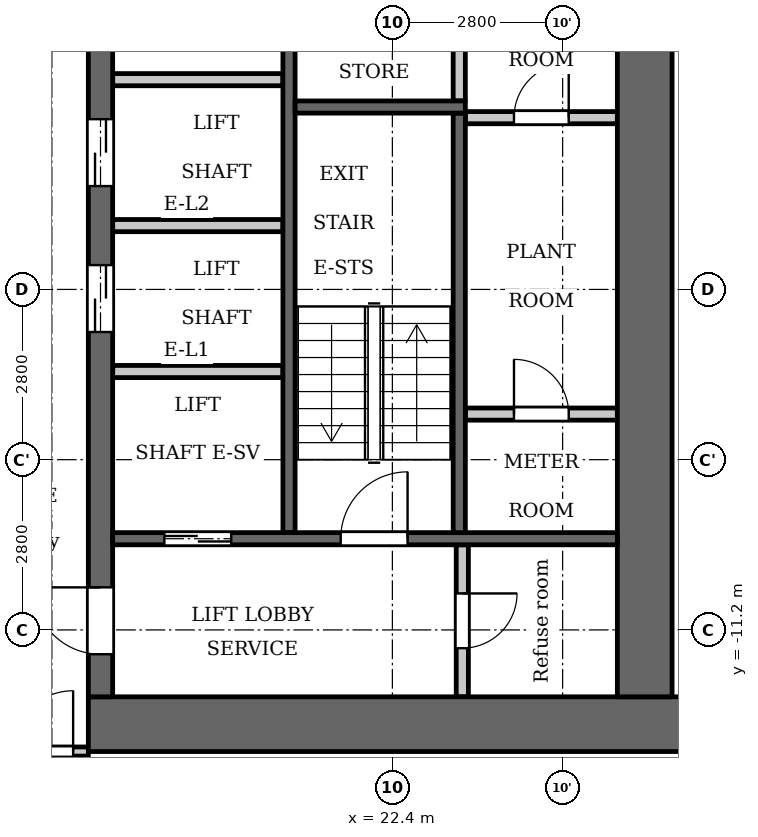
"""IFC4 building model, lengths in metres.
Left out: names, types, materials, properties, quantities, classifications, styles, units other than length and angle.
Written with IfcOpenShell. Run it as: python <this file> out.ifc"""

import sys

from ifc_helpers import new_model, si_unit, direction, frame, frame_2d, origin, place, context, subcontext, project, spatial, rectangle, extrude, element, fill, save


model = new_model("IFC4")
c1 = context("Model", 3, precision=1e-05, world=origin(), true_north=direction((0.0, 1.0)))
c2 = subcontext(c1, "Body", "Model", "MODEL_VIEW")
j1 = project(units=[si_unit("LENGTHUNIT", "METRE"), si_unit("PLANEANGLEUNIT", "RADIAN")], contexts=[c1])
p1 = place(None, origin())
s1 = spatial("IfcSite", under=j1, at=p1, CompositionType="ELEMENT")
p2 = place(p1, origin())
s2 = spatial("IfcBuilding", under=s1, at=p2, CompositionType="ELEMENT")
p3 = place(p2, frame((0.0, 0.0, 90.3)))
s3 = spatial("IfcBuildingStorey", under=s2, at=p3, CompositionType="ELEMENT", Elevation=90.3)
p4 = place(p3, frame((23.5, -2.5, 0.0), z_axis=(0.0, 0.0, 1.0), x_axis=(0.0, 1.0, 0.0)))
e1 = element("IfcWall", 1, at=p4, inside=s3, PredefinedType="PARTITIONING", context=c2, shape_type="SweptSolid", body=[
    extrude(rectangle(XDim=2.65, YDim=0.2, at=frame_2d((1.325, 0.0))), origin(), (0.0, 0.0, 1.0), 3.2),
])
p5 = place(p3, frame((20.7, -9.6, 0.0), z_axis=(0.0, 0.0, 1.0), x_axis=(0.0, 1.0, 0.0)))
e2 = element("IfcWall", 2, at=p5, inside=s3, PredefinedType="SHEAR", context=c2, shape_type="SweptSolid", body=[
    extrude(rectangle(XDim=9.75, YDim=0.2, at=frame_2d((4.875, 0.0))), origin(), (0.0, 0.0, 1.0), 3.2),
])
p6 = place(p3, frame((17.4, -12.75, 0.0), z_axis=(0.0, 0.0, 1.0), x_axis=(1.0, 0.0, 0.0)))
e3 = element("IfcWall", 3, at=p6, inside=s3, PredefinedType="SHEAR", context=c2, shape_type="SweptSolid", body=[
    extrude(rectangle(XDim=10.4, YDim=0.9, at=frame_2d((5.2, 0.0))), origin(), (0.0, 0.0, 1.0), 3.2),
])
p7 = place(p3, frame((17.6, -12.3, 0.0), z_axis=(0.0, 0.0, 1.0), x_axis=(0.0, 1.0, 0.0)))
e4 = element("IfcWall", 4, at=p7, inside=s3, PredefinedType="SHEAR", context=c2, shape_type="SweptSolid", body=[
    extrude(rectangle(XDim=24.6, YDim=0.4, at=frame_2d((12.3, 0.0))), origin(), (0.0, 0.0, 1.0), 3.2),
])
p8 = place(p7, frame((6.0, 0.0, 0.0)))
e5 = element("IfcOpeningElement", 5, at=p8, cuts=e4, PredefinedType="OPENING", context=c2, shape_type="SweptSolid", body=[
    extrude(rectangle(XDim=1.1, YDim=2.1, at=frame_2d((0.55, 1.05))), frame((0.0, 0.21, 0.0), z_axis=(0.0, -1.0, 0.0), x_axis=(1.0, 0.0, 0.0)), (0.0, 0.0, 1.0), 0.42),
])
p9 = place(p7, frame((8.4, 0.0, 0.0)))
e6 = element("IfcOpeningElement", 6, at=p9, cuts=e4, PredefinedType="OPENING", context=c2, shape_type="SweptSolid", body=[
    extrude(rectangle(XDim=1.1, YDim=2.1, at=frame_2d((0.55, 1.05))), frame((0.0, 0.21, 0.0), z_axis=(0.0, -1.0, 0.0), x_axis=(1.0, 0.0, 0.0)), (0.0, 0.0, 1.0), 0.42),
])
p10 = place(p7, frame((10.8, 0.0, 0.0)))
e7 = element("IfcOpeningElement", 7, at=p10, cuts=e4, PredefinedType="OPENING", context=c2, shape_type="SweptSolid", body=[
    extrude(rectangle(XDim=1.1, YDim=2.1, at=frame_2d((0.55, 1.05))), frame((0.0, 0.21, 0.0), z_axis=(0.0, -1.0, 0.0), x_axis=(1.0, 0.0, 0.0)), (0.0, 0.0, 1.0), 0.42),
])
p11 = place(p7, frame((16.75, 0.0, 0.0)))
e8 = element("IfcOpeningElement", 8, at=p11, cuts=e4, PredefinedType="OPENING", context=c2, shape_type="SweptSolid", body=[
    extrude(rectangle(XDim=0.9, YDim=2.1, at=frame_2d((0.45, 1.05))), frame((0.0, 0.21, 0.0), z_axis=(0.0, -1.0, 0.0), x_axis=(1.0, 0.0, 0.0)), (0.0, 0.0, 1.0), 0.42),
])
p12 = place(p7, frame((22.8, 0.0, 0.0)))
e9 = element("IfcOpeningElement", 9, at=p12, cuts=e4, PredefinedType="OPENING", context=c2, shape_type="SweptSolid", body=[
    extrude(rectangle(XDim=1.1, YDim=2.1, at=frame_2d((0.55, 1.05))), frame((0.0, 0.21, 0.0), z_axis=(0.0, -1.0, 0.0), x_axis=(1.0, 0.0, 0.0)), (0.0, 0.0, 1.0), 0.42),
])
p13 = place(p7, frame((0.7, 0.0, 0.0)))
e10 = element("IfcOpeningElement", 10, at=p13, cuts=e4, PredefinedType="OPENING", context=c2, shape_type="SweptSolid", body=[
    extrude(rectangle(XDim=1.1, YDim=2.1, at=frame_2d((0.55, 1.05))), frame((0.0, 0.21, 0.0), z_axis=(0.0, -1.0, 0.0), x_axis=(1.0, 0.0, 0.0)), (0.0, 0.0, 1.0), 0.42),
])
p14 = place(p7, frame((12.775, 0.0, 0.0)))
e11 = element("IfcOpeningElement", 11, at=p14, cuts=e4, PredefinedType="OPENING", context=c2, shape_type="SweptSolid", body=[
    extrude(rectangle(XDim=1.8, YDim=2.1, at=frame_2d((0.9, 1.05))), frame((0.0, 0.21, 0.0), z_axis=(0.0, -1.0, 0.0), x_axis=(1.0, 0.0, 0.0)), (0.0, 0.0, 1.0), 0.42),
])
p15 = place(p3, frame((26.55, -12.3, 0.0), z_axis=(0.0, 0.0, 1.0), x_axis=(0.0, 1.0, 0.0)))
e12 = element("IfcWall", 12, at=p15, inside=s3, PredefinedType="SHEAR", context=c2, shape_type="SweptSolid", body=[
    extrude(rectangle(XDim=24.6, YDim=0.9, at=frame_2d((12.3, 0.0))), origin(), (0.0, 0.0, 1.0), 3.2),
])
p16 = place(p3, frame((23.55, -12.3, 0.0), z_axis=(0.0, 0.0, 1.0), x_axis=(0.0, 1.0, 0.0)))
e13 = element("IfcWall", 13, at=p16, inside=s3, PredefinedType="PARTITIONING", context=c2, shape_type="SweptSolid", body=[
    extrude(rectangle(XDim=2.5, YDim=0.2, at=frame_2d((1.25, 0.0))), origin(), (0.0, 0.0, 1.0), 3.2),
])
p17 = place(p16, frame((0.8, 0.0, 0.0)))
e14 = element("IfcOpeningElement", 14, at=p17, cuts=e13, PredefinedType="OPENING", context=c2, shape_type="SweptSolid", body=[
    extrude(rectangle(XDim=0.9, YDim=2.1, at=frame_2d((0.45, 1.05))), frame((0.0, 0.11, 0.0), z_axis=(0.0, -1.0, 0.0), x_axis=(1.0, 0.0, 0.0)), (0.0, 0.0, 1.0), 0.22),
])
p18 = place(p3, frame((23.6, -7.65, 0.0), z_axis=(0.0, 0.0, 1.0), x_axis=(1.0, 0.0, 0.0)))
e15 = element("IfcWall", 15, at=p18, inside=s3, PredefinedType="PARTITIONING", context=c2, shape_type="SweptSolid", body=[
    extrude(rectangle(XDim=2.5, YDim=0.2, at=frame_2d((1.25, 0.0))), origin(), (0.0, 0.0, 1.0), 3.2),
])
p19 = place(p18, frame((0.8, 0.0, 0.0)))
e16 = element("IfcOpeningElement", 16, at=p19, cuts=e15, PredefinedType="OPENING", context=c2, shape_type="SweptSolid", body=[
    extrude(rectangle(XDim=0.9, YDim=2.1, at=frame_2d((0.45, 1.05))), frame((0.0, 0.11, 0.0), z_axis=(0.0, -1.0, 0.0), x_axis=(1.0, 0.0, 0.0)), (0.0, 0.0, 1.0), 0.22),
])
p20 = place(p3, frame((23.6, -2.775, 0.0), z_axis=(0.0, 0.0, 1.0), x_axis=(1.0, 0.0, 0.0)))
e17 = element("IfcWall", 17, at=p20, inside=s3, PredefinedType="PARTITIONING", context=c2, shape_type="SweptSolid", body=[
    extrude(rectangle(XDim=2.5, YDim=0.2, at=frame_2d((1.25, 0.0))), origin(), (0.0, 0.0, 1.0), 3.2),
])
p21 = place(p20, frame((0.8, 0.0, 0.0)))
e18 = element("IfcOpeningElement", 18, at=p21, cuts=e17, PredefinedType="OPENING", context=c2, shape_type="SweptSolid", body=[
    extrude(rectangle(XDim=0.9, YDim=2.1, at=frame_2d((0.45, 1.05))), frame((0.0, 0.11, 0.0), z_axis=(0.0, -1.0, 0.0), x_axis=(1.0, 0.0, 0.0)), (0.0, 0.0, 1.0), 0.22),
])
p22 = place(p3, frame((17.8, -9.7, 0.0), z_axis=(0.0, 0.0, 1.0), x_axis=(1.0, 0.0, 0.0)))
e19 = element("IfcWall", 19, at=p22, inside=s3, PredefinedType="SHEAR", context=c2, shape_type="SweptSolid", body=[
    extrude(rectangle(XDim=8.3, YDim=0.2, at=frame_2d((4.15, 0.0))), origin(), (0.0, 0.0, 1.0), 3.2),
])
p23 = place(p22, frame((0.85, 0.0, 0.0)))
e20 = element("IfcOpeningElement", 20, at=p23, cuts=e19, PredefinedType="OPENING", context=c2, shape_type="SweptSolid", body=[
    extrude(rectangle(XDim=1.1, YDim=2.1, at=frame_2d((0.55, 1.05))), frame((0.0, 0.11, 0.0), z_axis=(0.0, -1.0, 0.0), x_axis=(1.0, 0.0, 0.0)), (0.0, 0.0, 1.0), 0.22),
])
p24 = place(p22, frame((3.75, 0.0, 0.0)))
e21 = element("IfcOpeningElement", 21, at=p24, cuts=e19, PredefinedType="OPENING", context=c2, shape_type="SweptSolid", body=[
    extrude(rectangle(XDim=1.1, YDim=2.1, at=frame_2d((0.55, 1.05))), frame((0.0, 0.11, 0.0), z_axis=(0.0, -1.0, 0.0), x_axis=(1.0, 0.0, 0.0)), (0.0, 0.0, 1.0), 0.22),
])
for number, where, z_axis, x_axis in (
    (22, (17.8, -6.95, 0.0), (0.0, 0.0, 1.0), (1.0, 0.0, 0.0)),
    (23, (17.8, -4.55, 0.0), (0.0, 0.0, 1.0), (1.0, 0.0, 0.0)),
    (24, (17.8, -2.15, 0.0), (0.0, 0.0, 1.0), (1.0, 0.0, 0.0)),
):
    element("IfcWall", number, at=place(p3, frame(where, z_axis=z_axis, x_axis=x_axis)), inside=s3, PredefinedType="PARTITIONING", context=c2, shape_type="SweptSolid", body=[
        extrude(rectangle(XDim=2.8, YDim=0.2, at=frame_2d((1.4, 0.0))), origin(), (0.0, 0.0, 1.0), 3.2),
    ])
p25 = place(p3, frame((23.5, -9.6, 0.0), z_axis=(0.0, 0.0, 1.0), x_axis=(0.0, 1.0, 0.0)))
e25 = element("IfcWall", 25, at=p25, inside=s3, PredefinedType="SHEAR", context=c2, shape_type="SweptSolid", body=[
    extrude(rectangle(XDim=6.9, YDim=0.2, at=frame_2d((3.45, 0.0))), origin(), (0.0, 0.0, 1.0), 3.2),
])
p26 = place(p3, frame((20.8, -2.6, 0.0), z_axis=(0.0, 0.0, 1.0), x_axis=(1.0, 0.0, 0.0)))
e26 = element("IfcWall", 26, at=p26, inside=s3, PredefinedType="SHEAR", context=c2, shape_type="SweptSolid", body=[
    extrude(rectangle(XDim=2.8, YDim=0.2, at=frame_2d((1.4, 0.0))), origin(), (0.0, 0.0, 1.0), 3.2),
])
p27 = place(p3, frame((-17.4, -13.2, 0.0), z_axis=(0.0, 0.0, 1.0), x_axis=(1.0, 0.0, 0.0)))
e27 = element("IfcWall", 27, at=p27, inside=s3, PredefinedType="PARTITIONING", context=c2, shape_type="SweptSolid", body=[
    extrude(rectangle(XDim=34.8, YDim=0.15, at=frame_2d((17.4, 0.0))), origin(), (0.0, 0.0, 1.0), 3.2),
])
p28 = place(p27, frame((0.15, 0.0, 0.0)))
e28 = element("IfcOpeningElement", 28, at=p28, cuts=e27, PredefinedType="OPENING", context=c2, shape_type="SweptSolid", body=[
    extrude(rectangle(XDim=1.0, YDim=2.1, at=frame_2d((0.5, 1.05))), frame((0.0, 0.085, 0.0), z_axis=(0.0, -1.0, 0.0), x_axis=(1.0, 0.0, 0.0)), (0.0, 0.0, 1.0), 0.17),
])
p29 = place(p27, frame((33.55, 0.0, 0.0)))
e29 = element("IfcOpeningElement", 29, at=p29, cuts=e27, PredefinedType="OPENING", context=c2, shape_type="SweptSolid", body=[
    extrude(rectangle(XDim=1.0, YDim=2.1, at=frame_2d((0.5, 1.05))), frame((0.0, 0.085, 0.0), z_axis=(0.0, -1.0, 0.0), x_axis=(1.0, 0.0, 0.0)), (0.0, 0.0, 1.0), 0.17),
])
p30 = place(p27, frame((7.35, 0.0, 0.0)))
e30 = element("IfcOpeningElement", 30, at=p30, cuts=e27, PredefinedType="OPENING", context=c2, shape_type="SweptSolid", body=[
    extrude(rectangle(XDim=1.0, YDim=2.1, at=frame_2d((0.5, 1.05))), frame((0.0, 0.085, 0.0), z_axis=(0.0, -1.0, 0.0), x_axis=(1.0, 0.0, 0.0)), (0.0, 0.0, 1.0), 0.17),
])
p31 = place(p27, frame((13.7, 0.0, 0.0)))
e31 = element("IfcOpeningElement", 31, at=p31, cuts=e27, PredefinedType="OPENING", context=c2, shape_type="SweptSolid", body=[
    extrude(rectangle(XDim=1.0, YDim=2.1, at=frame_2d((0.5, 1.05))), frame((0.0, 0.085, 0.0), z_axis=(0.0, -1.0, 0.0), x_axis=(1.0, 0.0, 0.0)), (0.0, 0.0, 1.0), 0.17),
])
p32 = place(p27, frame((19.3, 0.0, 0.0)))
e32 = element("IfcOpeningElement", 32, at=p32, cuts=e27, PredefinedType="OPENING", context=c2, shape_type="SweptSolid", body=[
    extrude(rectangle(XDim=1.0, YDim=2.1, at=frame_2d((0.5, 1.05))), frame((0.0, 0.085, 0.0), z_axis=(0.0, -1.0, 0.0), x_axis=(1.0, 0.0, 0.0)), (0.0, 0.0, 1.0), 0.17),
])
p33 = place(p23, origin())
e33 = element("IfcDoor", 33, at=p33, inside=s3, OperationType="DOUBLE_DOOR_SLIDING", PredefinedType="DOOR", context=c2, shape_type="SweptSolid", body=[
    extrude(rectangle(XDim=1.1, YDim=2.1, at=frame_2d((0.55, 1.05))), frame((0.0, 0.025, 0.0), z_axis=(0.0, -1.0, 0.0), x_axis=(1.0, 0.0, 0.0)), (0.0, 0.0, 1.0), 0.05),
])
fill(e20, e33)
p34 = place(p8, origin())
e34 = element("IfcDoor", 34, at=p34, inside=s3, OperationType="DOUBLE_DOOR_SLIDING", PredefinedType="DOOR", context=c2, shape_type="SweptSolid", body=[
    extrude(rectangle(XDim=1.1, YDim=2.1, at=frame_2d((0.55, 1.05))), frame((0.0, 0.025, 0.0), z_axis=(0.0, -1.0, 0.0), x_axis=(1.0, 0.0, 0.0)), (0.0, 0.0, 1.0), 0.05),
])
fill(e5, e34)
p35 = place(p9, origin())
e35 = element("IfcDoor", 35, at=p35, inside=s3, OperationType="DOUBLE_DOOR_SLIDING", PredefinedType="DOOR", context=c2, shape_type="SweptSolid", body=[
    extrude(rectangle(XDim=1.1, YDim=2.1, at=frame_2d((0.55, 1.05))), frame((0.0, 0.025, 0.0), z_axis=(0.0, -1.0, 0.0), x_axis=(1.0, 0.0, 0.0)), (0.0, 0.0, 1.0), 0.05),
])
fill(e6, e35)
p36 = place(p13, origin())
e36 = element("IfcDoor", 36, at=p36, inside=s3, OperationType="SINGLE_SWING_LEFT", PredefinedType="DOOR", context=c2, shape_type="SweptSolid", body=[
    extrude(rectangle(XDim=1.1, YDim=2.1, at=frame_2d((0.55, 1.05))), frame((0.0, 0.025, 0.0), z_axis=(0.0, -1.0, 0.0), x_axis=(1.0, 0.0, 0.0)), (0.0, 0.0, 1.0), 0.05),
])
fill(e10, e36)
p37 = place(p17, origin())
e37 = element("IfcDoor", 37, at=p37, inside=s3, OperationType="SINGLE_SWING_RIGHT", PredefinedType="DOOR", context=c2, shape_type="SweptSolid", body=[
    extrude(rectangle(XDim=0.9, YDim=2.1, at=frame_2d((0.45, 1.05))), frame((0.0, 0.025, 0.0), z_axis=(0.0, -1.0, 0.0), x_axis=(1.0, 0.0, 0.0)), (0.0, 0.0, 1.0), 0.05),
])
fill(e14, e37)
p38 = place(p24, origin())
e38 = element("IfcDoor", 38, at=p38, inside=s3, OperationType="SINGLE_SWING_LEFT", PredefinedType="DOOR", context=c2, shape_type="SweptSolid", body=[
    extrude(rectangle(XDim=1.1, YDim=2.1, at=frame_2d((0.55, 1.05))), frame((0.0, 0.025, 0.0), z_axis=(0.0, -1.0, 0.0), x_axis=(1.0, 0.0, 0.0)), (0.0, 0.0, 1.0), 0.05),
])
fill(e21, e38)
p39 = place(p19, origin())
e39 = element("IfcDoor", 39, at=p39, inside=s3, OperationType="SINGLE_SWING_RIGHT", PredefinedType="DOOR", context=c2, shape_type="SweptSolid", body=[
    extrude(rectangle(XDim=0.9, YDim=2.1, at=frame_2d((0.45, 1.05))), frame((0.0, 0.025, 0.0), z_axis=(0.0, -1.0, 0.0), x_axis=(1.0, 0.0, 0.0)), (0.0, 0.0, 1.0), 0.05),
])
fill(e16, e39)
p40 = place(p21, origin())
e40 = element("IfcDoor", 40, at=p40, inside=s3, OperationType="SINGLE_SWING_LEFT", PredefinedType="DOOR", context=c2, shape_type="SweptSolid", body=[
    extrude(rectangle(XDim=0.9, YDim=2.1, at=frame_2d((0.45, 1.05))), frame((0.0, 0.025, 0.0), z_axis=(0.0, -1.0, 0.0), x_axis=(1.0, 0.0, 0.0)), (0.0, 0.0, 1.0), 0.05),
])
fill(e18, e40)
p41 = place(p29, origin())
e41 = element("IfcDoor", 41, at=p41, inside=s3, OperationType="SINGLE_SWING_LEFT", PredefinedType="DOOR", context=c2, shape_type="SweptSolid", body=[
    extrude(rectangle(XDim=1.0, YDim=2.1, at=frame_2d((0.5, 1.05))), frame((0.0, 0.025, 0.0), z_axis=(0.0, -1.0, 0.0), x_axis=(1.0, 0.0, 0.0)), (0.0, 0.0, 1.0), 0.05),
])
fill(e29, e41)
save(model, sys.argv[1])
